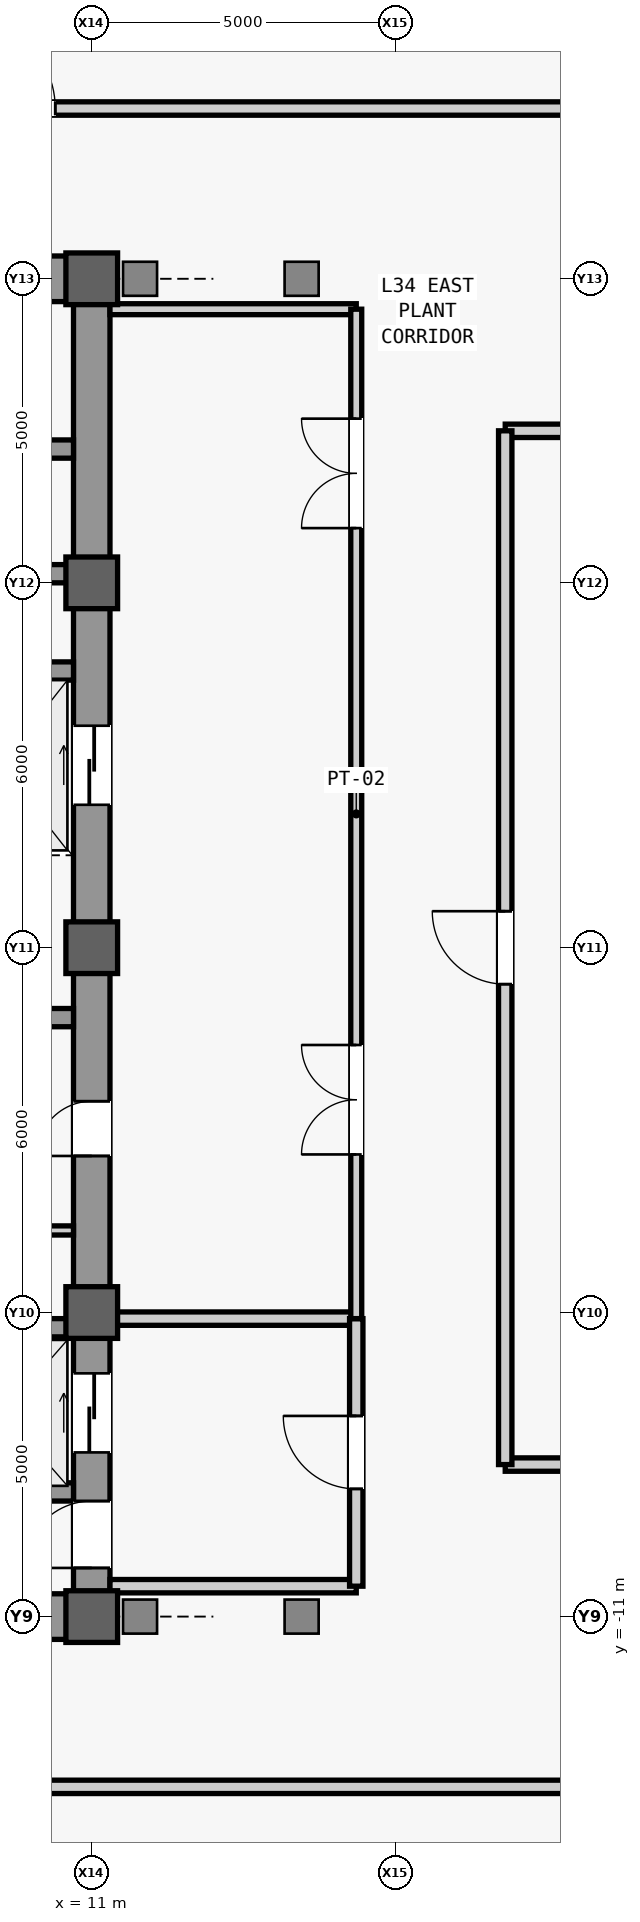
"""IFC4 building model, lengths in metres.
Left out: names, types, materials, properties, quantities, classifications, styles, units other than length and angle.
Written with IfcOpenShell. Run it as: python <this file> out.ifc"""

import sys

from ifc_helpers import new_model, si_unit, direction, frame, frame_2d, origin, origin_2d, place, context, subcontext, project, spatial, rectangle, extrude, source, transform, mapped, element, fill, save


model = new_model("IFC4")
c1 = context("Model", 3, precision=1e-05, world=origin(), true_north=direction((0.0, 1.0)))
c2 = subcontext(c1, "Body", "Model", "MODEL_VIEW")
j1 = project(units=[si_unit("LENGTHUNIT", "METRE"), si_unit("PLANEANGLEUNIT", "RADIAN")], contexts=[c1])
p1 = place(None, origin())
s1 = spatial("IfcSite", under=j1, at=p1, CompositionType="ELEMENT")
p2 = place(p1, origin())
s2 = spatial("IfcBuilding", under=s1, at=p2, CompositionType="ELEMENT")
p3 = place(p2, frame((0.0, 0.0, 149.9)))
s3 = spatial("IfcBuildingStorey", under=s2, at=p3, CompositionType="ELEMENT", Elevation=149.9)
m1 = source(origin(), c2, "Body", "SweptSolid", [
    extrude(rectangle(XDim=22.0, YDim=0.6, at=frame_2d((11.0, 0.0))), origin(), (0.0, 0.0, 1.0), 4.98),
])
p4 = place(p3, frame((11.0, -11.0, 0.0), z_axis=(0.0, 0.0, 1.0), x_axis=(0.0, 1.0, 0.0)))
e1 = element("IfcWall", 1, at=p4, inside=s3, PredefinedType="SHEAR", context=c2, shape_type="MappedRepresentation", body=[
    mapped(m1, transform((0.0, 0.0, 0.0), scale=1.0)),
])
m2 = source(origin(), c2, "Body", "SweptSolid", [
    extrude(rectangle(XDim=1.1, YDim=2.2, at=frame_2d((0.55, 1.1))), frame((0.0, 0.31, 0.0), z_axis=(0.0, -1.0, 0.0), x_axis=(1.0, 0.0, 0.0)), (0.0, 0.0, 1.0), 0.62),
])
p5 = place(p4, frame((0.8, 0.0, 0.0)))
e2 = element("IfcOpeningElement", 2, at=p5, cuts=e1, PredefinedType="OPENING", context=c2, shape_type="MappedRepresentation", body=[
    mapped(m2, transform((0.0, 0.0, 0.0), scale=1.0)),
])
m3 = source(origin(), c2, "Body", "SweptSolid", [
    extrude(rectangle(XDim=0.9, YDim=2.15, at=frame_2d((0.45, 1.075))), frame((0.0, 0.31, 0.0), z_axis=(0.0, -1.0, 0.0), x_axis=(1.0, 0.0, 0.0)), (0.0, 0.0, 1.0), 0.62),
])
p6 = place(p4, frame((7.575, 0.0, 0.0)))
e3 = element("IfcOpeningElement", 3, at=p6, cuts=e1, PredefinedType="OPENING", context=c2, shape_type="MappedRepresentation", body=[
    mapped(m3, transform((0.0, 0.0, 0.0), scale=1.0)),
])
m4 = source(origin(), c2, "Body", "SweptSolid", [
    extrude(rectangle(XDim=1.3, YDim=2.3, at=frame_2d((0.65, 1.15))), frame((0.0, 0.31, 0.0), z_axis=(0.0, -1.0, 0.0), x_axis=(1.0, 0.0, 0.0)), (0.0, 0.0, 1.0), 0.62),
])
p7 = place(p4, frame((2.7, 0.0, 0.0)))
e4 = element("IfcOpeningElement", 4, at=p7, cuts=e1, PredefinedType="OPENING", context=c2, shape_type="MappedRepresentation", body=[
    mapped(m4, transform((0.0, 0.0, 0.0), scale=1.0)),
])
p8 = place(p4, frame((13.35, 0.0, 0.0)))
e5 = element("IfcOpeningElement", 5, at=p8, cuts=e1, PredefinedType="OPENING", context=c2, shape_type="MappedRepresentation", body=[
    mapped(m4, transform((0.0, 0.0, 0.0), scale=1.0)),
])
m5 = source(origin(), c2, "Body", "SweptSolid", [
    extrude(rectangle(XDim=5.85, YDim=0.75, at=frame_2d((2.925, 0.0))), origin(), (0.0, 0.0, 1.0), 4.98),
])
p9 = place(p3, frame((4.85, -11.0, 0.0), z_axis=(0.0, 0.0, 1.0), x_axis=(1.0, 0.0, 0.0)))
e6 = element("IfcWall", 6, at=p9, inside=s3, PredefinedType="SHEAR", context=c2, shape_type="MappedRepresentation", body=[
    mapped(m5, transform((0.0, 0.0, 0.0), scale=1.0)),
])
p10 = place(p3, frame((4.85, 11.0, 0.0), z_axis=(0.0, 0.0, 1.0), x_axis=(1.0, 0.0, 0.0)))
e7 = element("IfcWall", 7, at=p10, inside=s3, PredefinedType="SHEAR", context=c2, shape_type="MappedRepresentation", body=[
    mapped(m5, transform((0.0, 0.0, 0.0), scale=1.0)),
])
m6 = source(origin(), c2, "Body", "SweptSolid", [
    extrude(rectangle(XDim=0.9, YDim=2.15, at=frame_2d((0.45, 1.075))), frame((0.0, 0.385, 0.0), z_axis=(0.0, -1.0, 0.0), x_axis=(1.0, 0.0, 0.0)), (0.0, 0.0, 1.0), 0.77),
])
p11 = place(p10, frame((0.5, 0.0, 0.0)))
e8 = element("IfcOpeningElement", 8, at=p11, cuts=e7, PredefinedType="OPENING", context=c2, shape_type="MappedRepresentation", body=[
    mapped(m6, transform((0.0, 0.0, 0.0), scale=1.0)),
])
m7 = source(origin(), c2, "Body", "SweptSolid", [
    extrude(rectangle(XDim=5.6, YDim=0.3, at=frame_2d((2.8, 0.0))), origin(), (0.0, 0.0, 1.0), 4.98),
])
p12 = place(p3, frame((5.1, -1.15, 0.0), z_axis=(0.0, 0.0, 1.0), x_axis=(1.0, 0.0, 0.0)))
e9 = element("IfcWall", 9, at=p12, inside=s3, PredefinedType="SHEAR", context=c2, shape_type="MappedRepresentation", body=[
    mapped(m7, transform((0.0, 0.0, 0.0), scale=1.0)),
])
m8 = source(origin(), c2, "Body", "SweptSolid", [
    extrude(rectangle(XDim=0.85, YDim=0.85, at=origin_2d()), origin(), (0.0, 0.0, 1.0), 5.2),
])
for number, where, z_axis, x_axis in (
    (10, (11.0, -11.0, 0.0), (0.0, 0.0, 1.0), (1.0, 0.0, 0.0)),
    (11, (11.0, -6.0, 0.0), (0.0, 0.0, 1.0), (1.0, 0.0, 0.0)),
    (12, (11.0, 0.0, 0.0), (0.0, 0.0, 1.0), (1.0, 0.0, 0.0)),
    (13, (11.0, 6.0, 0.0), (0.0, 0.0, 1.0), (1.0, 0.0, 0.0)),
    (14, (11.0, 11.0, 0.0), (0.0, 0.0, 1.0), (1.0, 0.0, 0.0)),
):
    element("IfcColumn", number, at=place(p3, frame(where, z_axis=z_axis, x_axis=x_axis)), inside=s3, PredefinedType="COLUMN", context=c2, shape_type="MappedRepresentation", body=[
        mapped(m8, transform((0.0, 0.0, 0.0), scale=1.0)),
    ])
m9 = source(origin(), c2, "Body", "SweptSolid", [
    extrude(rectangle(XDim=2.2, YDim=0.3, at=frame_2d((1.1, 0.0))), origin(), (0.0, 0.0, 1.0), 4.98),
])
for number, where, z_axis, x_axis in (
    (15, (8.5, -8.95, 0.0), (0.0, 0.0, 1.0), (1.0, 0.0, 0.0)),
    (16, (8.5, -6.25, 0.0), (0.0, 0.0, 1.0), (1.0, 0.0, 0.0)),
):
    element("IfcWall", number, at=place(p3, frame(where, z_axis=z_axis, x_axis=x_axis)), inside=s3, PredefinedType="SHEAR", context=c2, shape_type="MappedRepresentation", body=[
        mapped(m9, transform((0.0, 0.0, 0.0), scale=1.0)),
    ])
m10 = source(origin(), c2, "Body", "SweptSolid", [
    extrude(rectangle(XDim=2.3, YDim=0.3, at=frame_2d((1.15, 0.0))), origin(), (0.0, 0.0, 1.0), 4.98),
])
for number, where, z_axis, x_axis in (
    (17, (8.4, 4.55, 0.0), (0.0, 0.0, 1.0), (1.0, 0.0, 0.0)),
    (18, (8.4, 6.15, 0.0), (0.0, 0.0, 1.0), (1.0, 0.0, 0.0)),
    (19, (8.4, 8.2, 0.0), (0.0, 0.0, 1.0), (1.0, 0.0, 0.0)),
):
    element("IfcWall", number, at=place(p3, frame(where, z_axis=z_axis, x_axis=x_axis)), inside=s3, PredefinedType="SHEAR", context=c2, shape_type="MappedRepresentation", body=[
        mapped(m10, transform((0.0, 0.0, 0.0), scale=1.0)),
    ])
m11 = source(origin(), c2, "Body", "SweptSolid", [
    extrude(rectangle(XDim=2.05, YDim=0.15, at=frame_2d((1.025, 0.0))), origin(), (0.0, 0.0, 1.0), 4.98),
])
p13 = place(p3, frame((8.65, -4.65, 0.0), z_axis=(0.0, 0.0, 1.0), x_axis=(1.0, 0.0, 0.0)))
e20 = element("IfcWall", 20, at=p13, inside=s3, PredefinedType="PARTITIONING", context=c2, shape_type="MappedRepresentation", body=[
    mapped(m11, transform((0.0, 0.0, 0.0), scale=1.0)),
])
m12 = source(origin(), c2, "Body", "SweptSolid", [
    extrude(rectangle(XDim=4.05, YDim=0.22, at=frame_2d((2.025, 0.0))), origin(), (0.0, 0.0, 1.0), 4.98),
])
p14 = place(p3, frame((11.3, -10.5, 0.0), z_axis=(0.0, 0.0, 1.0), x_axis=(1.0, 0.0, 0.0)))
e21 = element("IfcWall", 21, at=p14, inside=s3, PredefinedType="PARTITIONING", context=c2, shape_type="MappedRepresentation", body=[
    mapped(m12, transform((0.0, 0.0, 0.0), scale=1.0)),
])
m13 = source(origin(), c2, "Body", "SweptSolid", [
    extrude(rectangle(XDim=4.05, YDim=0.22, at=frame_2d((2.025, 0.0))), origin(), (0.0, 0.0, 1.0), 4.207),
])
p15 = place(p3, frame((11.3, -6.1, 0.0), z_axis=(0.0, 0.0, 1.0), x_axis=(1.0, 0.0, 0.0)))
e22 = element("IfcWall", 22, at=p15, inside=s3, PredefinedType="PARTITIONING", context=c2, shape_type="MappedRepresentation", body=[
    mapped(m13, transform((0.0, 0.0, 0.0), scale=1.0)),
])
m14 = source(origin(), c2, "Body", "SweptSolid", [
    extrude(rectangle(XDim=4.4, YDim=0.22, at=frame_2d((2.2, 0.0))), origin(), (0.0, 0.0, 1.0), 4.98),
])
p16 = place(p3, frame((15.35, -10.5, 0.0), z_axis=(0.0, 0.0, 1.0), x_axis=(0.0, 1.0, 0.0)))
e23 = element("IfcWall", 23, at=p16, inside=s3, PredefinedType="PARTITIONING", context=c2, shape_type="MappedRepresentation", body=[
    mapped(m14, transform((0.0, 0.0, 0.0), scale=1.0)),
])
m15 = source(origin(), c2, "Body", "SweptSolid", [
    extrude(rectangle(XDim=1.2, YDim=2.2, at=frame_2d((0.6, 1.1))), frame((0.0, 0.12, 0.0), z_axis=(0.0, -1.0, 0.0), x_axis=(1.0, 0.0, 0.0)), (0.0, 0.0, 1.0), 0.24),
])
p17 = place(p16, frame((1.6, 0.0, 0.0)))
e24 = element("IfcOpeningElement", 24, at=p17, cuts=e23, PredefinedType="OPENING", context=c2, shape_type="MappedRepresentation", body=[
    mapped(m15, transform((0.0, 0.0, 0.0), scale=1.0)),
])
m16 = source(origin(), c2, "Body", "SweptSolid", [
    extrude(rectangle(XDim=4.05, YDim=0.18, at=frame_2d((2.025, 0.0))), origin(), (0.0, 0.0, 1.0), 4.98),
])
p18 = place(p3, frame((11.3, 10.5, 0.0), z_axis=(0.0, 0.0, 1.0), x_axis=(1.0, 0.0, 0.0)))
e25 = element("IfcWall", 25, at=p18, inside=s3, PredefinedType="PARTITIONING", context=c2, shape_type="MappedRepresentation", body=[
    mapped(m16, transform((0.0, 0.0, 0.0), scale=1.0)),
])
m17 = source(origin(), c2, "Body", "SweptSolid", [
    extrude(rectangle(XDim=16.6, YDim=0.18, at=frame_2d((8.3, 0.0))), origin(), (0.0, 0.0, 1.0), 4.98),
])
p19 = place(p3, frame((15.35, -6.1, 0.0), z_axis=(0.0, 0.0, 1.0), x_axis=(0.0, 1.0, 0.0)))
e26 = element("IfcWall", 26, at=p19, inside=s3, PredefinedType="PARTITIONING", context=c2, shape_type="MappedRepresentation", body=[
    mapped(m17, transform((0.0, 0.0, 0.0), scale=1.0)),
])
m18 = source(origin(), c2, "Body", "SweptSolid", [
    extrude(rectangle(XDim=1.8, YDim=2.25, at=frame_2d((0.9, 1.125))), frame((0.0, 0.1, 0.0), z_axis=(0.0, -1.0, 0.0), x_axis=(1.0, 0.0, 0.0)), (0.0, 0.0, 1.0), 0.2),
])
p20 = place(p19, frame((2.7, 0.0, 0.0)))
e27 = element("IfcOpeningElement", 27, at=p20, cuts=e26, PredefinedType="OPENING", context=c2, shape_type="MappedRepresentation", body=[
    mapped(m18, transform((0.0, 0.0, 0.0), scale=1.0)),
])
p21 = place(p19, frame((13.0, 0.0, 0.0)))
e28 = element("IfcOpeningElement", 28, at=p21, cuts=e26, PredefinedType="OPENING", context=c2, shape_type="MappedRepresentation", body=[
    mapped(m18, transform((0.0, 0.0, 0.0), scale=1.0)),
])
m19 = source(origin(), c2, "Body", "SweptSolid", [
    extrude(rectangle(XDim=51.0, YDim=0.22, at=frame_2d((25.5, 0.0))), origin(), (0.0, 0.0, 1.0), 4.98),
])
p22 = place(p3, frame((-25.5, -13.8, 0.0), z_axis=(0.0, 0.0, 1.0), x_axis=(1.0, 0.0, 0.0)))
e29 = element("IfcWall", 29, at=p22, inside=s3, PredefinedType="PARTITIONING", context=c2, shape_type="MappedRepresentation", body=[
    mapped(m19, transform((0.0, 0.0, 0.0), scale=1.0)),
])
m20 = source(origin(), c2, "Body", "SweptSolid", [
    extrude(rectangle(XDim=1.5, YDim=2.3, at=frame_2d((0.75, 1.15))), frame((0.0, 0.12, 0.0), z_axis=(0.0, -1.0, 0.0), x_axis=(1.0, 0.0, 0.0)), (0.0, 0.0, 1.0), 0.24),
])
p23 = place(p22, frame((18.5, 0.0, 0.0)))
e30 = element("IfcOpeningElement", 30, at=p23, cuts=e29, PredefinedType="OPENING", context=c2, shape_type="MappedRepresentation", body=[
    mapped(m20, transform((0.0, 0.0, 0.0), scale=1.0)),
])
p24 = place(p22, frame((31.5, 0.0, 0.0)))
e31 = element("IfcOpeningElement", 31, at=p24, cuts=e29, PredefinedType="OPENING", context=c2, shape_type="MappedRepresentation", body=[
    mapped(m20, transform((0.0, 0.0, 0.0), scale=1.0)),
])
p25 = place(p3, frame((-25.5, 13.8, 0.0), z_axis=(0.0, 0.0, 1.0), x_axis=(1.0, 0.0, 0.0)))
e32 = element("IfcWall", 32, at=p25, inside=s3, PredefinedType="PARTITIONING", context=c2, shape_type="MappedRepresentation", body=[
    mapped(m19, transform((0.0, 0.0, 0.0), scale=1.0)),
])
p26 = place(p25, frame((16.25, 0.0, 0.0)))
e33 = element("IfcOpeningElement", 33, at=p26, cuts=e32, PredefinedType="OPENING", context=c2, shape_type="MappedRepresentation", body=[
    mapped(m20, transform((0.0, 0.0, 0.0), scale=1.0)),
])
p27 = place(p25, frame((25.25, 0.0, 0.0)))
e34 = element("IfcOpeningElement", 34, at=p27, cuts=e32, PredefinedType="OPENING", context=c2, shape_type="MappedRepresentation", body=[
    mapped(m20, transform((0.0, 0.0, 0.0), scale=1.0)),
])
p28 = place(p25, frame((34.4, 0.0, 0.0)))
e35 = element("IfcOpeningElement", 35, at=p28, cuts=e32, PredefinedType="OPENING", context=c2, shape_type="MappedRepresentation", body=[
    mapped(m20, transform((0.0, 0.0, 0.0), scale=1.0)),
])
m21 = source(origin(), c2, "Body", "SweptSolid", [
    extrude(rectangle(XDim=12.2, YDim=0.22, at=frame_2d((6.1, 0.0))), origin(), (0.0, 0.0, 1.0), 4.98),
])
for number, where, z_axis, x_axis in (
    (36, (17.8, -8.5, 0.0), (0.0, 0.0, 1.0), (1.0, 0.0, 0.0)),
    (37, (17.8, 8.5, 0.0), (0.0, 0.0, 1.0), (1.0, 0.0, 0.0)),
):
    element("IfcWall", number, at=place(p3, frame(where, z_axis=z_axis, x_axis=x_axis)), inside=s3, PredefinedType="PARTITIONING", context=c2, shape_type="MappedRepresentation", body=[
        mapped(m21, transform((0.0, 0.0, 0.0), scale=1.0)),
    ])
m22 = source(origin(), c2, "Body", "SweptSolid", [
    extrude(rectangle(XDim=17.0, YDim=0.22, at=frame_2d((8.5, 0.0))), origin(), (0.0, 0.0, 1.0), 4.98),
])
p29 = place(p3, frame((17.8, -8.5, 0.0), z_axis=(0.0, 0.0, 1.0), x_axis=(0.0, 1.0, 0.0)))
e38 = element("IfcWall", 38, at=p29, inside=s3, PredefinedType="PARTITIONING", context=c2, shape_type="MappedRepresentation", body=[
    mapped(m22, transform((0.0, 0.0, 0.0), scale=1.0)),
])
p30 = place(p29, frame((7.9, 0.0, 0.0)))
e39 = element("IfcOpeningElement", 39, at=p30, cuts=e38, PredefinedType="OPENING", context=c2, shape_type="MappedRepresentation", body=[
    mapped(m15, transform((0.0, 0.0, 0.0), scale=1.0)),
])
m23 = source(origin(), c2, "Body", "SweptSolid", [
    extrude(rectangle(XDim=1.1, YDim=2.2, at=frame_2d((0.55, 1.1))), frame((0.0, 0.025, 0.0), z_axis=(0.0, -1.0, 0.0), x_axis=(1.0, 0.0, 0.0)), (0.0, 0.0, 1.0), 0.05),
])
p31 = place(p5, origin())
e40 = element("IfcDoor", 40, at=p31, inside=s3, OperationType="SINGLE_SWING_LEFT", PredefinedType="DOOR", context=c2, shape_type="MappedRepresentation", body=[
    mapped(m23, transform((0.0, 0.0, 0.0), scale=1.0)),
])
fill(e2, e40)
m24 = source(origin(), c2, "Body", "SweptSolid", [
    extrude(rectangle(XDim=0.9, YDim=2.15, at=frame_2d((0.45, 1.075))), frame((0.0, 0.025, 0.0), z_axis=(0.0, -1.0, 0.0), x_axis=(1.0, 0.0, 0.0)), (0.0, 0.0, 1.0), 0.05),
])
p32 = place(p6, origin())
e41 = element("IfcDoor", 41, at=p32, inside=s3, OperationType="SINGLE_SWING_LEFT", PredefinedType="DOOR", context=c2, shape_type="MappedRepresentation", body=[
    mapped(m24, transform((0.0, 0.0, 0.0), scale=1.0)),
])
fill(e3, e41)
m25 = source(origin(), c2, "Body", "SweptSolid", [
    extrude(rectangle(XDim=1.2, YDim=2.2, at=frame_2d((0.6, 1.1))), frame((0.0, 0.025, 0.0), z_axis=(0.0, -1.0, 0.0), x_axis=(1.0, 0.0, 0.0)), (0.0, 0.0, 1.0), 0.05),
])
p33 = place(p17, origin())
e42 = element("IfcDoor", 42, at=p33, inside=s3, OperationType="SINGLE_SWING_RIGHT", PredefinedType="DOOR", context=c2, shape_type="MappedRepresentation", body=[
    mapped(m25, transform((0.0, 0.0, 0.0), scale=1.0)),
])
fill(e24, e42)
m26 = source(origin(), c2, "Body", "SweptSolid", [
    extrude(rectangle(XDim=1.8, YDim=2.25, at=frame_2d((0.9, 1.125))), frame((0.0, 0.025, 0.0), z_axis=(0.0, -1.0, 0.0), x_axis=(1.0, 0.0, 0.0)), (0.0, 0.0, 1.0), 0.05),
])
p34 = place(p20, origin())
e43 = element("IfcDoor", 43, at=p34, inside=s3, OperationType="SINGLE_SWING_RIGHT", PredefinedType="DOOR", context=c2, shape_type="MappedRepresentation", body=[
    mapped(m26, transform((0.0, 0.0, 0.0), scale=1.0)),
])
fill(e27, e43)
p35 = place(p21, origin())
e44 = element("IfcDoor", 44, at=p35, inside=s3, OperationType="SINGLE_SWING_LEFT", PredefinedType="DOOR", context=c2, shape_type="MappedRepresentation", body=[
    mapped(m26, transform((0.0, 0.0, 0.0), scale=1.0)),
])
fill(e28, e44)
m27 = source(origin(), c2, "Body", "SweptSolid", [
    extrude(rectangle(XDim=1.5, YDim=2.3, at=frame_2d((0.75, 1.15))), frame((0.0, 0.025, 0.0), z_axis=(0.0, -1.0, 0.0), x_axis=(1.0, 0.0, 0.0)), (0.0, 0.0, 1.0), 0.05),
])
p36 = place(p28, origin())
e45 = element("IfcDoor", 45, at=p36, inside=s3, OperationType="SINGLE_SWING_LEFT", PredefinedType="DOOR", context=c2, shape_type="MappedRepresentation", body=[
    mapped(m27, transform((0.0, 0.0, 0.0), scale=1.0)),
])
fill(e35, e45)
p37 = place(p30, origin())
e46 = element("IfcDoor", 46, at=p37, inside=s3, OperationType="SINGLE_SWING_RIGHT", PredefinedType="DOOR", context=c2, shape_type="MappedRepresentation", body=[
    mapped(m25, transform((0.0, 0.0, 0.0), scale=1.0)),
])
fill(e39, e46)
m28 = source(origin(), c2, "Body", "SweptSolid", [
    extrude(rectangle(XDim=1.3, YDim=2.3, at=frame_2d((0.65, 1.15))), frame((0.0, 0.025, 0.0), z_axis=(0.0, -1.0, 0.0), x_axis=(1.0, 0.0, 0.0)), (0.0, 0.0, 1.0), 0.05),
])
p38 = place(p7, origin())
e47 = element("IfcDoor", 47, at=p38, inside=s3, OperationType="SLIDING_TO_LEFT", PredefinedType="DOOR", context=c2, shape_type="MappedRepresentation", body=[
    mapped(m28, transform((0.0, 0.0, 0.0), scale=1.0)),
])
fill(e4, e47)
p39 = place(p8, origin())
e48 = element("IfcDoor", 48, at=p39, inside=s3, OperationType="SLIDING_TO_LEFT", PredefinedType="DOOR", context=c2, shape_type="MappedRepresentation", body=[
    mapped(m28, transform((0.0, 0.0, 0.0), scale=1.0)),
])
fill(e5, e48)
save(model, sys.argv[1])
